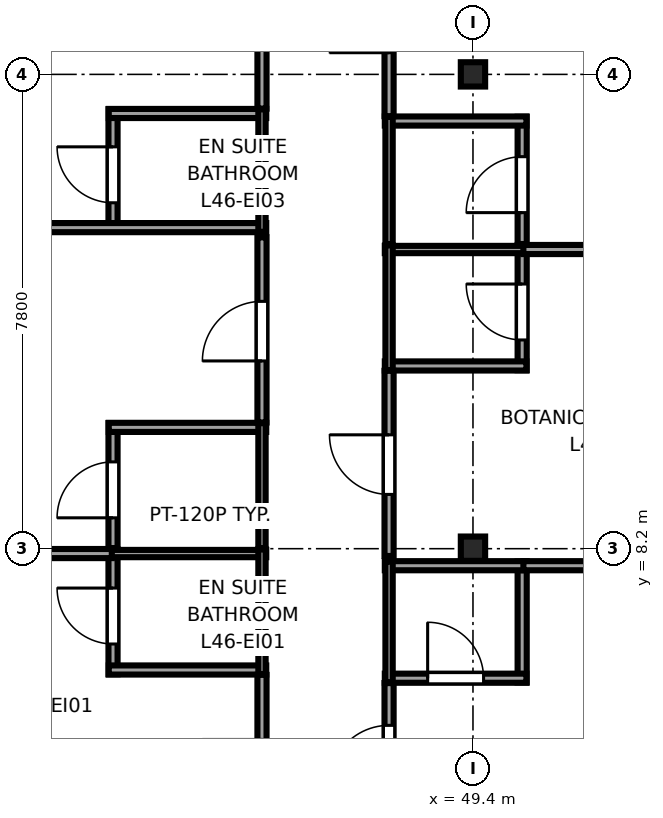
"""IFC4 building model, lengths in metres.
Left out: names, types, materials, properties, quantities, classifications, styles, units other than length and angle.
Written with IfcOpenShell. Run it as: python <this file> out.ifc"""

import sys

from ifc_helpers import new_model, si_unit, direction, frame, frame_2d, origin, origin_2d, place, context, subcontext, project, spatial, rectangle, i_section, extrude, source, transform, mapped, element, fill, save


model = new_model("IFC4")
c1 = context("Model", 3, precision=1e-05, world=origin(), true_north=direction((0.0, 1.0)))
c2 = subcontext(c1, "Body", "Model", "MODEL_VIEW")
j1 = project(units=[si_unit("LENGTHUNIT", "METRE"), si_unit("PLANEANGLEUNIT", "RADIAN")], contexts=[c1])
p1 = place(None, origin())
s1 = spatial("IfcSite", under=j1, at=p1, CompositionType="ELEMENT")
p2 = place(p1, origin())
s2 = spatial("IfcBuilding", under=s1, at=p2, CompositionType="ELEMENT")
p3 = place(p2, frame((0.0, 0.0, 175.45)))
s3 = spatial("IfcBuildingStorey", under=s2, at=p3, CompositionType="ELEMENT", Elevation=175.45)
m1 = source(origin(), c2, "Body", "SweptSolid", [
    extrude(i_section(OverallWidth=0.4, OverallDepth=0.4, WebThickness=0.02, FlangeThickness=0.035, at=origin_2d()), origin(), (0.0, 0.0, 1.0), 3.55),
])
for number, where, z_axis, x_axis in (
    (1, (49.4, 8.2, 0.0), (0.0, 0.0, 1.0), (1.0, 0.0, 0.0)),
    (2, (49.4, 16.0, 0.0), (0.0, 0.0, 1.0), (1.0, 0.0, 0.0)),
):
    element("IfcColumn", number, at=place(p3, frame(where, z_axis=z_axis, x_axis=x_axis)), inside=s3, PredefinedType="COLUMN", context=c2, shape_type="MappedRepresentation", body=[
        mapped(m1, transform((0.0, 0.0, 0.0), x_axis=(1.0, 0.0, 0.0), y_axis=(0.0, 1.0, 0.0), z_axis=(0.0, 0.0, 1.0), scale=1.0)),
    ])
p4 = place(p3, frame((43.48, 6.135, 0.0), z_axis=(0.0, 0.0, 1.0), x_axis=(0.0, 1.0, 0.0)))
e3 = element("IfcWall", 3, at=p4, inside=s3, PredefinedType="PARTITIONING", context=c2, shape_type="SweptSolid", body=[
    extrude(rectangle(XDim=2.055, YDim=0.15, at=frame_2d((1.027, 0.0))), origin(), (0.0, 0.0, 1.0), 3.37),
])
p5 = place(p4, frame((0.498, 0.0, 0.0)))
e4 = element("IfcOpeningElement", 4, at=p5, cuts=e3, PredefinedType="OPENING", context=c2, shape_type="SweptSolid", body=[
    extrude(rectangle(XDim=0.92, YDim=2.01, at=frame_2d((0.46, 1.005))), frame((0.0, 0.085, 0.0), z_axis=(0.0, -1.0, 0.0), x_axis=(1.0, 0.0, 0.0)), (0.0, 0.0, 1.0), 0.17),
])
p6 = place(p3, frame((43.41, 6.205, 0.0), z_axis=(0.0, 0.0, 1.0), x_axis=(1.0, 0.0, 0.0)))
e5 = element("IfcWall", 5, at=p6, inside=s3, PredefinedType="PARTITIONING", context=c2, shape_type="SweptSolid", body=[
    extrude(rectangle(XDim=2.59, YDim=0.15, at=frame_2d((1.295, 0.0))), origin(), (0.0, 0.0, 1.0), 3.37),
])
p7 = place(p3, frame((43.41, 8.12, 0.0), z_axis=(0.0, 0.0, 1.0), x_axis=(1.0, 0.0, 0.0)))
e6 = element("IfcWall", 6, at=p7, inside=s3, PredefinedType="PLUMBINGWALL", context=c2, shape_type="SweptSolid", body=[
    extrude(rectangle(XDim=2.59, YDim=0.12, at=frame_2d((1.295, 0.0))), origin(), (0.0, 0.0, 1.0), 2.758),
])
p8 = place(p3, frame((45.93, 6.135, 0.0), z_axis=(0.0, 0.0, 1.0), x_axis=(0.0, 1.0, 0.0)))
e7 = element("IfcWall", 7, at=p8, inside=s3, PredefinedType="PLUMBINGWALL", context=c2, shape_type="SweptSolid", body=[
    extrude(rectangle(XDim=2.055, YDim=0.12, at=frame_2d((1.027, 0.0))), origin(), (0.0, 0.0, 1.0), 3.37),
])
p9 = place(p3, frame((43.48, 8.21, 0.0), z_axis=(0.0, 0.0, 1.0), x_axis=(0.0, 1.0, 0.0)))
e8 = element("IfcWall", 8, at=p9, inside=s3, PredefinedType="PARTITIONING", context=c2, shape_type="SweptSolid", body=[
    extrude(rectangle(XDim=2.055, YDim=0.15, at=frame_2d((1.027, 0.0))), origin(), (0.0, 0.0, 1.0), 3.37),
])
p10 = place(p9, frame((0.498, 0.0, 0.0)))
e9 = element("IfcOpeningElement", 9, at=p10, cuts=e8, PredefinedType="OPENING", context=c2, shape_type="SweptSolid", body=[
    extrude(rectangle(XDim=0.92, YDim=2.01, at=frame_2d((0.46, 1.005))), frame((0.0, 0.085, 0.0), z_axis=(0.0, -1.0, 0.0), x_axis=(1.0, 0.0, 0.0)), (0.0, 0.0, 1.0), 0.17),
])
p11 = place(p3, frame((43.41, 10.195, 0.0), z_axis=(0.0, 0.0, 1.0), x_axis=(1.0, 0.0, 0.0)))
e10 = element("IfcWall", 10, at=p11, inside=s3, PredefinedType="PARTITIONING", context=c2, shape_type="SweptSolid", body=[
    extrude(rectangle(XDim=2.59, YDim=0.15, at=frame_2d((1.295, 0.0))), origin(), (0.0, 0.0, 1.0), 3.37),
])
p12 = place(p3, frame((45.93, 8.21, 0.0), z_axis=(0.0, 0.0, 1.0), x_axis=(0.0, 1.0, 0.0)))
e11 = element("IfcWall", 11, at=p12, inside=s3, PredefinedType="PLUMBINGWALL", context=c2, shape_type="SweptSolid", body=[
    extrude(rectangle(XDim=2.055, YDim=0.12, at=frame_2d((1.027, 0.0))), origin(), (0.0, 0.0, 1.0), 3.37),
])
p13 = place(p3, frame((43.48, 13.41, 0.0), z_axis=(0.0, 0.0, 1.0), x_axis=(0.0, 1.0, 0.0)))
e12 = element("IfcWall", 12, at=p13, inside=s3, PredefinedType="PARTITIONING", context=c2, shape_type="SweptSolid", body=[
    extrude(rectangle(XDim=2.017, YDim=0.15, at=frame_2d((1.009, 0.0))), origin(), (0.0, 0.0, 1.0), 3.37),
])
p14 = place(p13, frame((0.479, 0.0, 0.0)))
e13 = element("IfcOpeningElement", 13, at=p14, cuts=e12, PredefinedType="OPENING", context=c2, shape_type="SweptSolid", body=[
    extrude(rectangle(XDim=0.92, YDim=2.01, at=frame_2d((0.46, 1.005))), frame((0.0, 0.085, 0.0), z_axis=(0.0, -1.0, 0.0), x_axis=(1.0, 0.0, 0.0)), (0.0, 0.0, 1.0), 0.17),
])
p15 = place(p3, frame((34.65, 13.48, 0.0), z_axis=(0.0, 0.0, 1.0), x_axis=(1.0, 0.0, 0.0)))
e14 = element("IfcWall", 14, at=p15, inside=s3, PredefinedType="PARTITIONING", context=c2, shape_type="SweptSolid", body=[
    extrude(rectangle(XDim=11.35, YDim=0.15, at=frame_2d((5.675, 0.0))), origin(), (0.0, 0.0, 1.0), 3.37),
])
p16 = place(p3, frame((43.41, 15.357, 0.0), z_axis=(0.0, 0.0, 1.0), x_axis=(1.0, 0.0, 0.0)))
e15 = element("IfcWall", 15, at=p16, inside=s3, PredefinedType="PARTITIONING", context=c2, shape_type="SweptSolid", body=[
    extrude(rectangle(XDim=2.59, YDim=0.15, at=frame_2d((1.295, 0.0))), origin(), (0.0, 0.0, 1.0), 3.37),
])
p17 = place(p3, frame((45.93, 13.41, 0.0), z_axis=(0.0, 0.0, 1.0), x_axis=(0.0, 1.0, 0.0)))
e16 = element("IfcWall", 16, at=p17, inside=s3, PredefinedType="PLUMBINGWALL", context=c2, shape_type="SweptSolid", body=[
    extrude(rectangle(XDim=2.017, YDim=0.12, at=frame_2d((1.009, 0.0))), origin(), (0.0, 0.0, 1.0), 3.37),
])
p18 = place(p3, frame((50.209, 6.0, 0.0), z_axis=(0.0, 0.0, 1.0), x_axis=(0.0, 1.0, 0.0)))
e17 = element("IfcWall", 17, at=p18, inside=s3, PredefinedType="PARTITIONING", context=c2, shape_type="SweptSolid", body=[
    extrude(rectangle(XDim=1.99, YDim=0.15, at=frame_2d((0.995, 0.0))), origin(), (0.0, 0.0, 1.0), 3.37),
])
p19 = place(p3, frame((47.95, 6.07, 0.0), z_axis=(0.0, 0.0, 1.0), x_axis=(1.0, 0.0, 0.0)))
e18 = element("IfcWall", 18, at=p19, inside=s3, PredefinedType="PARTITIONING", context=c2, shape_type="SweptSolid", body=[
    extrude(rectangle(XDim=2.329, YDim=0.15, at=frame_2d((1.165, 0.0))), origin(), (0.0, 0.0, 1.0), 3.37),
])
p20 = place(p19, frame((0.705, 0.0, 0.0)))
e19 = element("IfcOpeningElement", 19, at=p20, cuts=e18, PredefinedType="OPENING", context=c2, shape_type="SweptSolid", body=[
    extrude(rectangle(XDim=0.92, YDim=2.01, at=frame_2d((0.46, 1.005))), frame((0.0, 0.085, 0.0), z_axis=(0.0, -1.0, 0.0), x_axis=(1.0, 0.0, 0.0)), (0.0, 0.0, 1.0), 0.17),
])
p21 = place(p3, frame((47.95, 7.92, 0.0), z_axis=(0.0, 0.0, 1.0), x_axis=(1.0, 0.0, 0.0)))
e20 = element("IfcWall", 20, at=p21, inside=s3, PredefinedType="PARTITIONING", context=c2, shape_type="SweptSolid", body=[
    extrude(rectangle(XDim=2.329, YDim=0.15, at=frame_2d((1.165, 0.0))), origin(), (0.0, 0.0, 1.0), 3.37),
])
p22 = place(p3, frame((48.02, 6.0, 0.0), z_axis=(0.0, 0.0, 1.0), x_axis=(0.0, 1.0, 0.0)))
e21 = element("IfcWall", 21, at=p22, inside=s3, PredefinedType="PLUMBINGWALL", context=c2, shape_type="SweptSolid", body=[
    extrude(rectangle(XDim=1.99, YDim=0.12, at=frame_2d((0.995, 0.0))), origin(), (0.0, 0.0, 1.0), 3.37),
])
p23 = place(p3, frame((50.209, 11.135, 0.0), z_axis=(0.0, 0.0, 1.0), x_axis=(0.0, 1.0, 0.0)))
e22 = element("IfcWall", 22, at=p23, inside=s3, PredefinedType="PARTITIONING", context=c2, shape_type="SweptSolid", body=[
    extrude(rectangle(XDim=2.055, YDim=0.15, at=frame_2d((1.027, 0.0))), origin(), (0.0, 0.0, 1.0), 3.37),
])
p24 = place(p23, frame((0.498, 0.0, 0.0)))
e23 = element("IfcOpeningElement", 23, at=p24, cuts=e22, PredefinedType="OPENING", context=c2, shape_type="SweptSolid", body=[
    extrude(rectangle(XDim=0.92, YDim=2.01, at=frame_2d((0.46, 1.005))), frame((0.0, 0.085, 0.0), z_axis=(0.0, -1.0, 0.0), x_axis=(1.0, 0.0, 0.0)), (0.0, 0.0, 1.0), 0.17),
])
p25 = place(p3, frame((47.95, 11.205, 0.0), z_axis=(0.0, 0.0, 1.0), x_axis=(1.0, 0.0, 0.0)))
e24 = element("IfcWall", 24, at=p25, inside=s3, PredefinedType="PARTITIONING", context=c2, shape_type="SweptSolid", body=[
    extrude(rectangle(XDim=2.329, YDim=0.15, at=frame_2d((1.165, 0.0))), origin(), (0.0, 0.0, 1.0), 3.37),
])
p26 = place(p3, frame((47.95, 13.12, 0.0), z_axis=(0.0, 0.0, 1.0), x_axis=(1.0, 0.0, 0.0)))
e25 = element("IfcWall", 25, at=p26, inside=s3, PredefinedType="PLUMBINGWALL", context=c2, shape_type="SweptSolid", body=[
    extrude(rectangle(XDim=2.329, YDim=0.12, at=frame_2d((1.165, 0.0))), origin(), (0.0, 0.0, 1.0), 3.37),
])
p27 = place(p3, frame((48.02, 11.135, 0.0), z_axis=(0.0, 0.0, 1.0), x_axis=(0.0, 1.0, 0.0)))
e26 = element("IfcWall", 26, at=p27, inside=s3, PredefinedType="PLUMBINGWALL", context=c2, shape_type="SweptSolid", body=[
    extrude(rectangle(XDim=2.055, YDim=0.12, at=frame_2d((1.027, 0.0))), origin(), (0.0, 0.0, 1.0), 3.37),
])
p28 = place(p3, frame((50.209, 13.21, 0.0), z_axis=(0.0, 0.0, 1.0), x_axis=(0.0, 1.0, 0.0)))
e27 = element("IfcWall", 27, at=p28, inside=s3, PredefinedType="PARTITIONING", context=c2, shape_type="SweptSolid", body=[
    extrude(rectangle(XDim=2.093, YDim=0.15, at=frame_2d((1.046, 0.0))), origin(), (0.0, 0.0, 1.0), 3.37),
])
p29 = place(p28, frame((0.517, 0.0, 0.0)))
e28 = element("IfcOpeningElement", 28, at=p29, cuts=e27, PredefinedType="OPENING", context=c2, shape_type="SweptSolid", body=[
    extrude(rectangle(XDim=0.92, YDim=2.01, at=frame_2d((0.46, 1.005))), frame((0.0, 0.085, 0.0), z_axis=(0.0, -1.0, 0.0), x_axis=(1.0, 0.0, 0.0)), (0.0, 0.0, 1.0), 0.17),
])
p30 = place(p3, frame((47.95, 15.233, 0.0), z_axis=(0.0, 0.0, 1.0), x_axis=(1.0, 0.0, 0.0)))
e29 = element("IfcWall", 29, at=p30, inside=s3, PredefinedType="PARTITIONING", context=c2, shape_type="SweptSolid", body=[
    extrude(rectangle(XDim=2.329, YDim=0.15, at=frame_2d((1.165, 0.0))), origin(), (0.0, 0.0, 1.0), 3.37),
])
p31 = place(p3, frame((48.02, 13.21, 0.0), z_axis=(0.0, 0.0, 1.0), x_axis=(0.0, 1.0, 0.0)))
e30 = element("IfcWall", 30, at=p31, inside=s3, PredefinedType="PLUMBINGWALL", context=c2, shape_type="SweptSolid", body=[
    extrude(rectangle(XDim=2.093, YDim=0.12, at=frame_2d((1.046, 0.0))), origin(), (0.0, 0.0, 1.0), 3.37),
])
p32 = place(p3, frame((45.93, 3.005, 0.0), z_axis=(0.0, 0.0, 1.0), x_axis=(0.0, 1.0, 0.0)))
e31 = element("IfcWall", 31, at=p32, inside=s3, PredefinedType="PARTITIONING", context=c2, shape_type="SweptSolid", body=[
    extrude(rectangle(XDim=3.12, YDim=0.15, at=frame_2d((1.56, 0.0))), origin(), (0.0, 0.0, 1.0), 3.37),
])
p33 = place(p32, frame((1.077, 0.0, 0.0)))
e32 = element("IfcOpeningElement", 32, at=p33, cuts=e31, PredefinedType="OPENING", context=c2, shape_type="SweptSolid", body=[
    extrude(rectangle(XDim=0.98, YDim=2.12, at=frame_2d((0.49, 1.06))), frame((0.0, 0.085, 0.0), z_axis=(0.0, -1.0, 0.0), x_axis=(1.0, 0.0, 0.0)), (0.0, 0.0, 1.0), 0.17),
])
p34 = place(p3, frame((34.65, 8.12, 0.0), z_axis=(0.0, 0.0, 1.0), x_axis=(1.0, 0.0, 0.0)))
e33 = element("IfcWall", 33, at=p34, inside=s3, PredefinedType="PARTITIONING", context=c2, shape_type="SweptSolid", body=[
    extrude(rectangle(XDim=8.81, YDim=0.15, at=frame_2d((4.405, 0.0))), origin(), (0.0, 0.0, 1.0), 2.758),
])
p35 = place(p3, frame((45.93, 10.275, 0.0), z_axis=(0.0, 0.0, 1.0), x_axis=(0.0, 1.0, 0.0)))
e34 = element("IfcWall", 34, at=p35, inside=s3, PredefinedType="PARTITIONING", context=c2, shape_type="SweptSolid", body=[
    extrude(rectangle(XDim=3.045, YDim=0.15, at=frame_2d((1.522, 0.0))), origin(), (0.0, 0.0, 1.0), 3.37),
])
p36 = place(p35, frame((1.012, 0.0, 0.0)))
e35 = element("IfcOpeningElement", 35, at=p36, cuts=e34, PredefinedType="OPENING", context=c2, shape_type="SweptSolid", body=[
    extrude(rectangle(XDim=0.98, YDim=2.12, at=frame_2d((0.49, 1.06))), frame((0.0, 0.085, 0.0), z_axis=(0.0, -1.0, 0.0), x_axis=(1.0, 0.0, 0.0)), (0.0, 0.0, 1.0), 0.17),
])
p37 = place(p3, frame((45.93, 15.437, 0.0), z_axis=(0.0, 0.0, 1.0), x_axis=(0.0, 1.0, 0.0)))
e36 = element("IfcWall", 36, at=p37, inside=s3, PredefinedType="PARTITIONING", context=c2, shape_type="SweptSolid", body=[
    extrude(rectangle(XDim=2.983, YDim=0.15, at=frame_2d((1.491, 0.0))), origin(), (0.0, 0.0, 1.0), 3.37),
])
p38 = place(p37, frame((0.981, 0.0, 0.0)))
e37 = element("IfcOpeningElement", 37, at=p38, cuts=e36, PredefinedType="OPENING", context=c2, shape_type="SweptSolid", body=[
    extrude(rectangle(XDim=0.98, YDim=2.12, at=frame_2d((0.49, 1.06))), frame((0.0, 0.085, 0.0), z_axis=(0.0, -1.0, 0.0), x_axis=(1.0, 0.0, 0.0)), (0.0, 0.0, 1.0), 0.17),
])
p39 = place(p3, frame((48.02, 3.005, 0.0), z_axis=(0.0, 0.0, 1.0), x_axis=(0.0, 1.0, 0.0)))
e38 = element("IfcWall", 38, at=p39, inside=s3, PredefinedType="PARTITIONING", context=c2, shape_type="SweptSolid", body=[
    extrude(rectangle(XDim=2.985, YDim=0.15, at=frame_2d((1.493, 0.0))), origin(), (0.0, 0.0, 1.0), 3.37),
])
p40 = place(p39, frame((1.31, 0.0, 0.0)))
e39 = element("IfcOpeningElement", 39, at=p40, cuts=e38, PredefinedType="OPENING", context=c2, shape_type="SweptSolid", body=[
    extrude(rectangle(XDim=0.98, YDim=2.12, at=frame_2d((0.49, 1.06))), frame((0.0, 0.085, 0.0), z_axis=(0.0, -1.0, 0.0), x_axis=(1.0, 0.0, 0.0)), (0.0, 0.0, 1.0), 0.17),
])
p41 = place(p3, frame((50.229, 7.92, 0.0), z_axis=(0.0, 0.0, 1.0), x_axis=(1.0, 0.0, 0.0)))
e40 = element("IfcWall", 40, at=p41, inside=s3, PredefinedType="PARTITIONING", context=c2, shape_type="SweptSolid", body=[
    extrude(rectangle(XDim=3.766, YDim=0.15, at=frame_2d((1.883, 0.0))), origin(), (0.0, 0.0, 1.0), 3.37),
])
p42 = place(p3, frame((48.02, 8.08, 0.0), z_axis=(0.0, 0.0, 1.0), x_axis=(0.0, 1.0, 0.0)))
e41 = element("IfcWall", 41, at=p42, inside=s3, PredefinedType="PARTITIONING", context=c2, shape_type="SweptSolid", body=[
    extrude(rectangle(XDim=3.045, YDim=0.15, at=frame_2d((1.522, 0.0))), origin(), (0.0, 0.0, 1.0), 3.37),
])
p43 = place(p42, frame((1.012, 0.0, 0.0)))
e42 = element("IfcOpeningElement", 42, at=p43, cuts=e41, PredefinedType="OPENING", context=c2, shape_type="SweptSolid", body=[
    extrude(rectangle(XDim=0.98, YDim=2.12, at=frame_2d((0.49, 1.06))), frame((0.0, 0.085, 0.0), z_axis=(0.0, -1.0, 0.0), x_axis=(1.0, 0.0, 0.0)), (0.0, 0.0, 1.0), 0.17),
])
p44 = place(p3, frame((50.229, 13.12, 0.0), z_axis=(0.0, 0.0, 1.0), x_axis=(1.0, 0.0, 0.0)))
e43 = element("IfcWall", 43, at=p44, inside=s3, PredefinedType="PARTITIONING", context=c2, shape_type="SweptSolid", body=[
    extrude(rectangle(XDim=3.766, YDim=0.15, at=frame_2d((1.883, 0.0))), origin(), (0.0, 0.0, 1.0), 3.37),
])
p45 = place(p3, frame((48.02, 15.313, 0.0), z_axis=(0.0, 0.0, 1.0), x_axis=(0.0, 1.0, 0.0)))
e44 = element("IfcWall", 44, at=p45, inside=s3, PredefinedType="PARTITIONING", context=c2, shape_type="SweptSolid", body=[
    extrude(rectangle(XDim=3.107, YDim=0.15, at=frame_2d((1.553, 0.0))), origin(), (0.0, 0.0, 1.0), 3.37),
])
p46 = place(p45, frame((1.043, 0.0, 0.0)))
e45 = element("IfcOpeningElement", 45, at=p46, cuts=e44, PredefinedType="OPENING", context=c2, shape_type="SweptSolid", body=[
    extrude(rectangle(XDim=0.98, YDim=2.12, at=frame_2d((0.49, 1.06))), frame((0.0, 0.085, 0.0), z_axis=(0.0, -1.0, 0.0), x_axis=(1.0, 0.0, 0.0)), (0.0, 0.0, 1.0), 0.17),
])
m2 = source(origin(), c2, "Body", "SweptSolid", [
    extrude(rectangle(XDim=0.92, YDim=2.01, at=frame_2d((0.46, 1.005))), frame((0.0, 0.025, 0.0), z_axis=(0.0, -1.0, 0.0), x_axis=(1.0, 0.0, 0.0)), (0.0, 0.0, 1.0), 0.05),
])
p47 = place(p5, origin())
e46 = element("IfcDoor", 46, at=p47, inside=s3, OperationType="SINGLE_SWING_RIGHT", PredefinedType="DOOR", context=c2, shape_type="MappedRepresentation", body=[
    mapped(m2, transform((0.0, 0.0, 0.0), x_axis=(1.0, 0.0, 0.0), y_axis=(0.0, 1.0, 0.0), z_axis=(0.0, 0.0, 1.0), scale=1.0)),
])
fill(e4, e46)
p48 = place(p10, origin())
e47 = element("IfcDoor", 47, at=p48, inside=s3, OperationType="SINGLE_SWING_LEFT", PredefinedType="DOOR", context=c2, shape_type="MappedRepresentation", body=[
    mapped(m2, transform((0.0, 0.0, 0.0), x_axis=(1.0, 0.0, 0.0), y_axis=(0.0, 1.0, 0.0), z_axis=(0.0, 0.0, 1.0), scale=1.0)),
])
fill(e9, e47)
p49 = place(p14, origin())
e48 = element("IfcDoor", 48, at=p49, inside=s3, OperationType="SINGLE_SWING_RIGHT", PredefinedType="DOOR", context=c2, shape_type="MappedRepresentation", body=[
    mapped(m2, transform((0.0, 0.0, 0.0), x_axis=(1.0, 0.0, 0.0), y_axis=(0.0, 1.0, 0.0), z_axis=(0.0, 0.0, 1.0), scale=1.0)),
])
fill(e13, e48)
p50 = place(p20, origin())
e49 = element("IfcDoor", 49, at=p50, inside=s3, OperationType="SINGLE_SWING_LEFT", PredefinedType="DOOR", context=c2, shape_type="MappedRepresentation", body=[
    mapped(m2, transform((0.0, 0.0, 0.0), x_axis=(1.0, 0.0, 0.0), y_axis=(0.0, 1.0, 0.0), z_axis=(0.0, 0.0, 1.0), scale=1.0)),
])
fill(e19, e49)
p51 = place(p24, origin())
e50 = element("IfcDoor", 50, at=p51, inside=s3, OperationType="SINGLE_SWING_RIGHT", PredefinedType="DOOR", context=c2, shape_type="MappedRepresentation", body=[
    mapped(m2, transform((0.0, 0.0, 0.0), x_axis=(1.0, 0.0, 0.0), y_axis=(0.0, 1.0, 0.0), z_axis=(0.0, 0.0, 1.0), scale=1.0)),
])
fill(e23, e50)
p52 = place(p29, origin())
e51 = element("IfcDoor", 51, at=p52, inside=s3, OperationType="SINGLE_SWING_LEFT", PredefinedType="DOOR", context=c2, shape_type="MappedRepresentation", body=[
    mapped(m2, transform((0.0, 0.0, 0.0), x_axis=(1.0, 0.0, 0.0), y_axis=(0.0, 1.0, 0.0), z_axis=(0.0, 0.0, 1.0), scale=1.0)),
])
fill(e28, e51)
m3 = source(origin(), c2, "Body", "SweptSolid", [
    extrude(rectangle(XDim=0.98, YDim=2.12, at=frame_2d((0.49, 1.06))), frame((0.0, 0.025, 0.0), z_axis=(0.0, -1.0, 0.0), x_axis=(1.0, 0.0, 0.0)), (0.0, 0.0, 1.0), 0.05),
])
p53 = place(p36, origin())
e52 = element("IfcDoor", 52, at=p53, inside=s3, OperationType="SINGLE_SWING_LEFT", PredefinedType="DOOR", context=c2, shape_type="MappedRepresentation", body=[
    mapped(m3, transform((0.0, 0.0, 0.0), x_axis=(1.0, 0.0, 0.0), y_axis=(0.0, 1.0, 0.0), z_axis=(0.0, 0.0, 1.0), scale=1.0)),
])
fill(e35, e52)
p54 = place(p40, origin())
e53 = element("IfcDoor", 53, at=p54, inside=s3, OperationType="SINGLE_SWING_LEFT", PredefinedType="DOOR", context=c2, shape_type="MappedRepresentation", body=[
    mapped(m3, transform((0.0, 0.0, 0.0), x_axis=(1.0, 0.0, 0.0), y_axis=(0.0, 1.0, 0.0), z_axis=(0.0, 0.0, 1.0), scale=1.0)),
])
fill(e39, e53)
p55 = place(p43, origin())
e54 = element("IfcDoor", 54, at=p55, inside=s3, OperationType="SINGLE_SWING_RIGHT", PredefinedType="DOOR", context=c2, shape_type="MappedRepresentation", body=[
    mapped(m3, transform((0.0, 0.0, 0.0), x_axis=(1.0, 0.0, 0.0), y_axis=(0.0, 1.0, 0.0), z_axis=(0.0, 0.0, 1.0), scale=1.0)),
])
fill(e42, e54)
p56 = place(p46, origin())
e55 = element("IfcDoor", 55, at=p56, inside=s3, OperationType="SINGLE_SWING_LEFT", PredefinedType="DOOR", context=c2, shape_type="MappedRepresentation", body=[
    mapped(m3, transform((0.0, 0.0, 0.0), x_axis=(1.0, 0.0, 0.0), y_axis=(0.0, 1.0, 0.0), z_axis=(0.0, 0.0, 1.0), scale=1.0)),
])
fill(e45, e55)
save(model, sys.argv[1])
